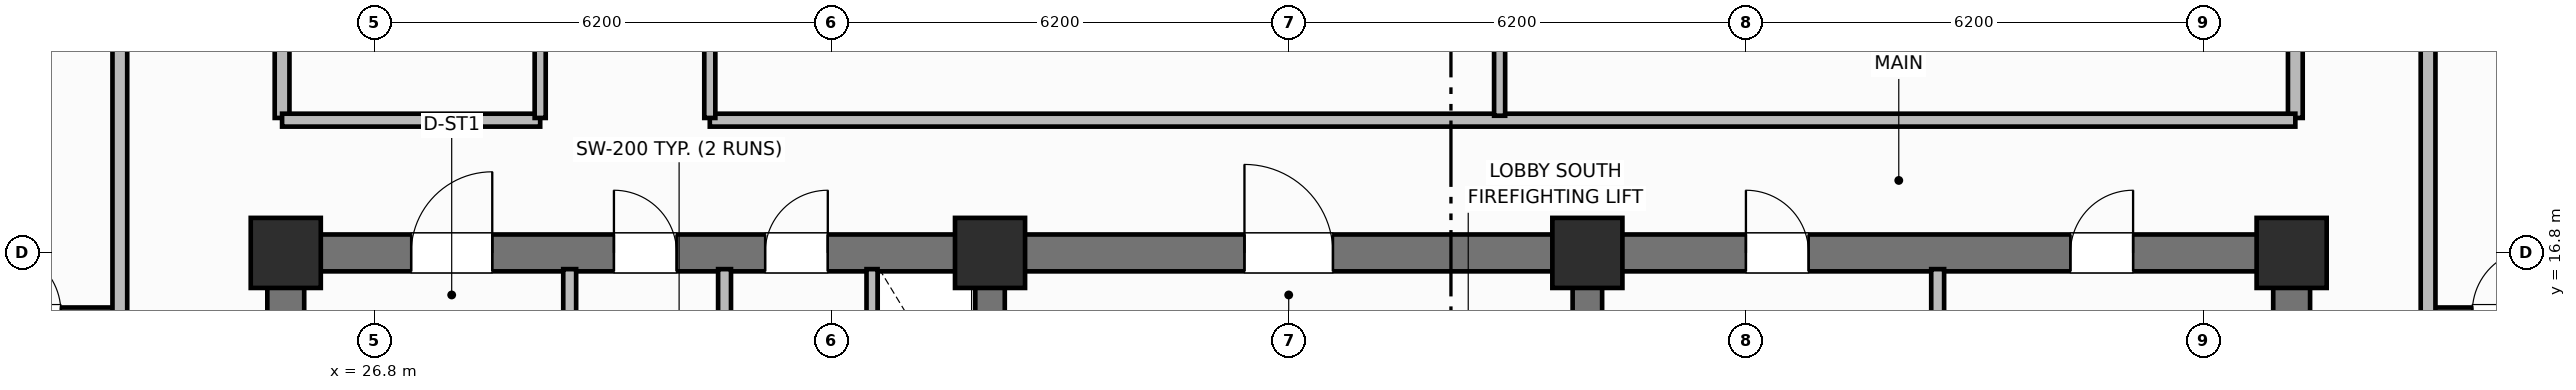
"""IFC4 building model, lengths in metres.
Left out: names, types, materials, properties, quantities, classifications, styles, units other than length and angle.
Written with IfcOpenShell. Run it as: python <this file> out.ifc"""

import sys

from ifc_helpers import new_model, si_unit, direction, frame, frame_2d, origin, origin_2d, place, context, subcontext, project, spatial, rectangle, extrude, element, fill, save


model = new_model("IFC4")
c1 = context("Model", 3, precision=1e-05, world=origin(), true_north=direction((0.0, 1.0)))
c2 = subcontext(c1, "Body", "Model", "MODEL_VIEW")
j1 = project(units=[si_unit("LENGTHUNIT", "METRE"), si_unit("PLANEANGLEUNIT", "RADIAN")], contexts=[c1])
p1 = place(None, origin())
s1 = spatial("IfcSite", under=j1, at=p1, CompositionType="ELEMENT")
p2 = place(p1, origin())
s2 = spatial("IfcBuilding", under=s1, at=p2, CompositionType="ELEMENT")
p3 = place(p2, frame((0.0, 0.0, 158.9)))
s3 = spatial("IfcBuildingStorey", under=s2, at=p3, CompositionType="ELEMENT", Elevation=158.9)
for number, where, z_axis, x_axis in (
    (1, (25.6, 10.85, 0.0), (0.0, 0.0, 1.0), (0.0, 1.0, 0.0)),
    (2, (52.8, 10.85, 0.0), (0.0, 0.0, 1.0), (0.0, 1.0, 0.0)),
):
    element("IfcWall", number, at=place(p3, frame(where, z_axis=z_axis, x_axis=x_axis)), inside=s3, PredefinedType="SHEAR", context=c2, shape_type="SweptSolid", body=[
        extrude(rectangle(XDim=5.7, YDim=0.5, at=frame_2d((2.85, 0.0))), origin(), (0.0, 0.0, 1.0), 3.7),
    ])
p4 = place(p3, frame((25.6, 16.8, 0.0), z_axis=(0.0, 0.0, 1.0), x_axis=(1.0, 0.0, 0.0)))
e3 = element("IfcWall", 3, at=p4, inside=s3, PredefinedType="SHEAR", context=c2, shape_type="SweptSolid", body=[
    extrude(rectangle(XDim=27.2, YDim=0.5, at=frame_2d((13.6, 0.0))), origin(), (0.0, 0.0, 1.0), 3.7),
])
p5 = place(p4, frame((1.7, 0.0, 0.0)))
e4 = element("IfcOpeningElement", 4, at=p5, cuts=e3, PredefinedType="OPENING", context=c2, shape_type="SweptSolid", body=[
    extrude(rectangle(XDim=1.1, YDim=2.15, at=frame_2d((0.55, 1.075))), frame((0.0, 0.26, 0.0), z_axis=(0.0, -1.0, 0.0), x_axis=(1.0, 0.0, 0.0)), (0.0, 0.0, 1.0), 0.52),
])
p6 = place(p4, frame((4.45, 0.0, 0.0)))
e5 = element("IfcOpeningElement", 5, at=p6, cuts=e3, PredefinedType="OPENING", context=c2, shape_type="SweptSolid", body=[
    extrude(rectangle(XDim=0.85, YDim=2.1, at=frame_2d((0.425, 1.05))), frame((0.0, 0.26, 0.0), z_axis=(0.0, -1.0, 0.0), x_axis=(1.0, 0.0, 0.0)), (0.0, 0.0, 1.0), 0.52),
])
p7 = place(p4, frame((6.5, 0.0, 0.0)))
e6 = element("IfcOpeningElement", 6, at=p7, cuts=e3, PredefinedType="OPENING", context=c2, shape_type="SweptSolid", body=[
    extrude(rectangle(XDim=0.85, YDim=2.1, at=frame_2d((0.425, 1.05))), frame((0.0, 0.26, 0.0), z_axis=(0.0, -1.0, 0.0), x_axis=(1.0, 0.0, 0.0)), (0.0, 0.0, 1.0), 0.52),
])
p8 = place(p4, frame((13.0, 0.0, 0.0)))
e7 = element("IfcOpeningElement", 7, at=p8, cuts=e3, PredefinedType="OPENING", context=c2, shape_type="SweptSolid", body=[
    extrude(rectangle(XDim=1.2, YDim=2.15, at=frame_2d((0.6, 1.075))), frame((0.0, 0.26, 0.0), z_axis=(0.0, -1.0, 0.0), x_axis=(1.0, 0.0, 0.0)), (0.0, 0.0, 1.0), 0.52),
])
p9 = place(p4, frame((19.8, 0.0, 0.0)))
e8 = element("IfcOpeningElement", 8, at=p9, cuts=e3, PredefinedType="OPENING", context=c2, shape_type="SweptSolid", body=[
    extrude(rectangle(XDim=0.85, YDim=2.1, at=frame_2d((0.425, 1.05))), frame((0.0, 0.26, 0.0), z_axis=(0.0, -1.0, 0.0), x_axis=(1.0, 0.0, 0.0)), (0.0, 0.0, 1.0), 0.52),
])
p10 = place(p4, frame((24.2, 0.0, 0.0)))
e9 = element("IfcOpeningElement", 9, at=p10, cuts=e3, PredefinedType="OPENING", context=c2, shape_type="SweptSolid", body=[
    extrude(rectangle(XDim=0.85, YDim=2.1, at=frame_2d((0.425, 1.05))), frame((0.0, 0.26, 0.0), z_axis=(0.0, -1.0, 0.0), x_axis=(1.0, 0.0, 0.0)), (0.0, 0.0, 1.0), 0.52),
])
for number, where, z_axis, x_axis in (
    (10, (35.15, 10.85, 0.0), (0.0, 0.0, 1.0), (0.0, 1.0, 0.0)),
    (11, (43.25, 10.85, 0.0), (0.0, 0.0, 1.0), (0.0, 1.0, 0.0)),
):
    element("IfcWall", number, at=place(p3, frame(where, z_axis=z_axis, x_axis=x_axis)), inside=s3, PredefinedType="SHEAR", context=c2, shape_type="SweptSolid", body=[
        extrude(rectangle(XDim=5.7, YDim=0.4, at=frame_2d((2.85, 0.0))), origin(), (0.0, 0.0, 1.0), 3.7),
    ])
for number, where, z_axis, x_axis in (
    (12, (25.6, 16.8, 0.0), (0.0, 0.0, 1.0), (1.0, 0.0, 0.0)),
    (13, (35.15, 16.8, 0.0), (0.0, 0.0, 1.0), (1.0, 0.0, 0.0)),
    (14, (43.25, 16.8, 0.0), (0.0, 0.0, 1.0), (1.0, 0.0, 0.0)),
    (15, (52.8, 16.8, 0.0), (0.0, 0.0, 1.0), (1.0, 0.0, 0.0)),
):
    element("IfcColumn", number, at=place(p3, frame(where, z_axis=z_axis, x_axis=x_axis)), inside=s3, PredefinedType="COLUMN", context=c2, shape_type="SweptSolid", body=[
        extrude(rectangle(XDim=0.95, YDim=0.95, at=origin_2d()), origin(), (0.0, 0.0, 1.0), 3.7),
    ])
for number, where, z_axis, x_axis in (
    (16, (29.45, 14.5, 0.0), (0.0, 0.0, 1.0), (0.0, 1.0, 0.0)),
    (17, (31.55, 14.5, 0.0), (0.0, 0.0, 1.0), (0.0, 1.0, 0.0)),
):
    element("IfcWall", number, at=place(p3, frame(where, z_axis=z_axis, x_axis=x_axis)), inside=s3, PredefinedType="PARTITIONING", context=c2, shape_type="SweptSolid", body=[
        extrude(rectangle(XDim=2.08, YDim=0.175, at=frame_2d((1.04, 0.0))), origin(), (0.0, 0.0, 1.0), 2.55),
    ])
p11 = place(p3, frame((33.55, 14.5, 0.0), z_axis=(0.0, 0.0, 1.0), x_axis=(0.0, 1.0, 0.0)))
e18 = element("IfcWall", 18, at=p11, inside=s3, PredefinedType="PARTITIONING", context=c2, shape_type="SweptSolid", body=[
    extrude(rectangle(XDim=2.08, YDim=0.15, at=frame_2d((1.04, 0.0))), origin(), (0.0, 0.0, 1.0), 2.55),
])
p12 = place(p11, frame((0.55, 0.0, 0.0)))
e19 = element("IfcOpeningElement", 19, at=p12, cuts=e18, PredefinedType="OPENING", context=c2, shape_type="SweptSolid", body=[
    extrude(rectangle(XDim=0.85, YDim=2.05, at=frame_2d((0.425, 1.025))), frame((0.0, 0.085, 0.0), z_axis=(0.0, -1.0, 0.0), x_axis=(1.0, 0.0, 0.0)), (0.0, 0.0, 1.0), 0.17),
])
p13 = place(p3, frame((48.0, 10.95, 0.0), z_axis=(0.0, 0.0, 1.0), x_axis=(0.0, 1.0, 0.0)))
e20 = element("IfcWall", 20, at=p13, inside=s3, PredefinedType="PARTITIONING", context=c2, shape_type="SweptSolid", body=[
    extrude(rectangle(XDim=5.63, YDim=0.175, at=frame_2d((2.815, 0.0))), origin(), (0.0, 0.0, 1.0), 2.55),
])
for number, where, z_axis, x_axis in (
    (21, (25.55, 18.63, 0.0), (0.0, 0.0, 1.0), (0.0, 1.0, 0.0)),
    (22, (52.85, 18.63, 0.0), (0.0, 0.0, 1.0), (0.0, 1.0, 0.0)),
):
    element("IfcWall", number, at=place(p3, frame(where, z_axis=z_axis, x_axis=x_axis)), inside=s3, PredefinedType="PARTITIONING", context=c2, shape_type="SweptSolid", body=[
        extrude(rectangle(XDim=19.14, YDim=0.2, at=frame_2d((9.57, 0.0))), origin(), (0.0, 0.0, 1.0), 2.55),
    ])
p14 = place(p3, frame((25.55, 18.6, 0.0), z_axis=(0.0, 0.0, 1.0), x_axis=(1.0, 0.0, 0.0)))
e23 = element("IfcWall", 23, at=p14, inside=s3, PredefinedType="PARTITIONING", context=c2, shape_type="SweptSolid", body=[
    extrude(rectangle(XDim=3.5, YDim=0.175, at=frame_2d((1.75, 0.0))), origin(), (0.0, 0.0, 1.0), 2.55),
])
p15 = place(p3, frame((31.35, 18.6, 0.0), z_axis=(0.0, 0.0, 1.0), x_axis=(1.0, 0.0, 0.0)))
e24 = element("IfcWall", 24, at=p15, inside=s3, PredefinedType="PARTITIONING", context=c2, shape_type="SweptSolid", body=[
    extrude(rectangle(XDim=21.5, YDim=0.175, at=frame_2d((10.75, 0.0))), origin(), (0.0, 0.0, 1.0), 2.55),
])
p16 = place(p3, frame((42.06, 18.66, 0.0), z_axis=(0.0, 0.0, 1.0), x_axis=(0.0, 1.0, 0.0)))
e25 = element("IfcWall", 25, at=p16, inside=s3, PredefinedType="PARTITIONING", context=c2, shape_type="SweptSolid", body=[
    extrude(rectangle(XDim=19.08, YDim=0.15, at=frame_2d((9.54, 0.0))), origin(), (0.0, 0.0, 1.0), 2.55),
])
p17 = place(p16, frame((6.5, 0.0, 0.0)))
e26 = element("IfcOpeningElement", 26, at=p17, cuts=e25, PredefinedType="OPENING", context=c2, shape_type="SweptSolid", body=[
    extrude(rectangle(XDim=1.0, YDim=2.15, at=frame_2d((0.5, 1.075))), frame((0.0, 0.085, 0.0), z_axis=(0.0, -1.0, 0.0), x_axis=(1.0, 0.0, 0.0)), (0.0, 0.0, 1.0), 0.17),
])
p18 = place(p3, frame((29.05, 18.63, 0.0), z_axis=(0.0, 0.0, 1.0), x_axis=(0.0, 1.0, 0.0)))
e27 = element("IfcWall", 27, at=p18, inside=s3, PredefinedType="PARTITIONING", context=c2, shape_type="SweptSolid", body=[
    extrude(rectangle(XDim=19.14, YDim=0.15, at=frame_2d((9.57, 0.0))), origin(), (0.0, 0.0, 1.0), 2.55),
])
p19 = place(p18, frame((5.5, 0.0, 0.0)))
e28 = element("IfcOpeningElement", 28, at=p19, cuts=e27, PredefinedType="OPENING", context=c2, shape_type="SweptSolid", body=[
    extrude(rectangle(XDim=1.0, YDim=2.15, at=frame_2d((0.5, 1.075))), frame((0.0, 0.085, 0.0), z_axis=(0.0, -1.0, 0.0), x_axis=(1.0, 0.0, 0.0)), (0.0, 0.0, 1.0), 0.17),
])
p20 = place(p3, frame((31.35, 18.63, 0.0), z_axis=(0.0, 0.0, 1.0), x_axis=(0.0, 1.0, 0.0)))
e29 = element("IfcWall", 29, at=p20, inside=s3, PredefinedType="PARTITIONING", context=c2, shape_type="SweptSolid", body=[
    extrude(rectangle(XDim=19.14, YDim=0.15, at=frame_2d((9.57, 0.0))), origin(), (0.0, 0.0, 1.0), 2.55),
])
p21 = place(p20, frame((5.5, 0.0, 0.0)))
e30 = element("IfcOpeningElement", 30, at=p21, cuts=e29, PredefinedType="OPENING", context=c2, shape_type="SweptSolid", body=[
    extrude(rectangle(XDim=1.0, YDim=2.15, at=frame_2d((0.5, 1.075))), frame((0.0, 0.085, 0.0), z_axis=(0.0, -1.0, 0.0), x_axis=(1.0, 0.0, 0.0)), (0.0, 0.0, 1.0), 0.17),
])
p22 = place(p3, frame((21.1, 16.0, 0.0), z_axis=(0.0, 0.0, 1.0), x_axis=(1.0, 0.0, 0.0)))
e31 = element("IfcWall", 31, at=p22, inside=s3, PredefinedType="PARTITIONING", context=c2, shape_type="SweptSolid", body=[
    extrude(rectangle(XDim=2.25, YDim=0.12, at=frame_2d((1.125, 0.0))), origin(), (0.0, 0.0, 1.0), 2.55),
])
p23 = place(p22, frame((0.6, 0.0, 0.0)))
e32 = element("IfcOpeningElement", 32, at=p23, cuts=e31, PredefinedType="OPENING", context=c2, shape_type="SweptSolid", body=[
    extrude(rectangle(XDim=0.85, YDim=2.1, at=frame_2d((0.425, 1.05))), frame((0.0, 0.07, 0.0), z_axis=(0.0, -1.0, 0.0), x_axis=(1.0, 0.0, 0.0)), (0.0, 0.0, 1.0), 0.14),
])
p24 = place(p3, frame((23.35, 10.6, 0.0), z_axis=(0.0, 0.0, 1.0), x_axis=(0.0, 1.0, 0.0)))
e33 = element("IfcWall", 33, at=p24, inside=s3, PredefinedType="PARTITIONING", context=c2, shape_type="SweptSolid", body=[
    extrude(rectangle(XDim=35.2, YDim=0.2, at=frame_2d((17.6, 0.0))), origin(), (0.0, 0.0, 1.0), 2.55),
])
p25 = place(p24, frame((2.65, 0.0, 0.0)))
e34 = element("IfcOpeningElement", 34, at=p25, cuts=e33, PredefinedType="OPENING", context=c2, shape_type="SweptSolid", body=[
    extrude(rectangle(XDim=1.0, YDim=2.15, at=frame_2d((0.5, 1.075))), frame((0.0, 0.11, 0.0), z_axis=(0.0, -1.0, 0.0), x_axis=(1.0, 0.0, 0.0)), (0.0, 0.0, 1.0), 0.22),
])
p26 = place(p24, frame((12.65, 0.0, 0.0)))
e35 = element("IfcOpeningElement", 35, at=p26, cuts=e33, PredefinedType="OPENING", context=c2, shape_type="SweptSolid", body=[
    extrude(rectangle(XDim=1.0, YDim=2.15, at=frame_2d((0.5, 1.075))), frame((0.0, 0.11, 0.0), z_axis=(0.0, -1.0, 0.0), x_axis=(1.0, 0.0, 0.0)), (0.0, 0.0, 1.0), 0.22),
])
p27 = place(p24, frame((23.782, 0.0, 0.0)))
e36 = element("IfcOpeningElement", 36, at=p27, cuts=e33, PredefinedType="OPENING", context=c2, shape_type="SweptSolid", body=[
    extrude(rectangle(XDim=1.0, YDim=2.15, at=frame_2d((0.5, 1.075))), frame((0.0, 0.11, 0.0), z_axis=(0.0, -1.0, 0.0), x_axis=(1.0, 0.0, 0.0)), (0.0, 0.0, 1.0), 0.22),
])
p28 = place(p3, frame((54.65, 16.0, 0.0), z_axis=(0.0, 0.0, 1.0), x_axis=(1.0, 0.0, 0.0)))
e37 = element("IfcWall", 37, at=p28, inside=s3, PredefinedType="PARTITIONING", context=c2, shape_type="SweptSolid", body=[
    extrude(rectangle(XDim=2.25, YDim=0.12, at=frame_2d((1.125, 0.0))), origin(), (0.0, 0.0, 1.0), 2.55),
])
p29 = place(p28, frame((0.6, 0.0, 0.0)))
e38 = element("IfcOpeningElement", 38, at=p29, cuts=e37, PredefinedType="OPENING", context=c2, shape_type="SweptSolid", body=[
    extrude(rectangle(XDim=0.85, YDim=2.1, at=frame_2d((0.425, 1.05))), frame((0.0, 0.07, 0.0), z_axis=(0.0, -1.0, 0.0), x_axis=(1.0, 0.0, 0.0)), (0.0, 0.0, 1.0), 0.14),
])
p30 = place(p3, frame((54.65, 10.6, 0.0), z_axis=(0.0, 0.0, 1.0), x_axis=(0.0, 1.0, 0.0)))
e39 = element("IfcWall", 39, at=p30, inside=s3, PredefinedType="PARTITIONING", context=c2, shape_type="SweptSolid", body=[
    extrude(rectangle(XDim=35.2, YDim=0.2, at=frame_2d((17.6, 0.0))), origin(), (0.0, 0.0, 1.0), 2.55),
])
p31 = place(p30, frame((2.65, 0.0, 0.0)))
e40 = element("IfcOpeningElement", 40, at=p31, cuts=e39, PredefinedType="OPENING", context=c2, shape_type="SweptSolid", body=[
    extrude(rectangle(XDim=1.0, YDim=2.15, at=frame_2d((0.5, 1.075))), frame((0.0, 0.11, 0.0), z_axis=(0.0, -1.0, 0.0), x_axis=(1.0, 0.0, 0.0)), (0.0, 0.0, 1.0), 0.22),
])
p32 = place(p30, frame((22.75, 0.0, 0.0)))
e41 = element("IfcOpeningElement", 41, at=p32, cuts=e39, PredefinedType="OPENING", context=c2, shape_type="SweptSolid", body=[
    extrude(rectangle(XDim=1.0, YDim=2.15, at=frame_2d((0.5, 1.075))), frame((0.0, 0.11, 0.0), z_axis=(0.0, -1.0, 0.0), x_axis=(1.0, 0.0, 0.0)), (0.0, 0.0, 1.0), 0.22),
])
p33 = place(p23, origin())
e42 = element("IfcDoor", 42, at=p33, inside=s3, OperationType="SINGLE_SWING_LEFT", PredefinedType="DOOR", context=c2, shape_type="SweptSolid", body=[
    extrude(rectangle(XDim=0.85, YDim=2.1, at=frame_2d((0.425, 1.05))), frame((0.0, 0.025, 0.0), z_axis=(0.0, -1.0, 0.0), x_axis=(1.0, 0.0, 0.0)), (0.0, 0.0, 1.0), 0.05),
])
fill(e32, e42)
p34 = place(p29, origin())
e43 = element("IfcDoor", 43, at=p34, inside=s3, OperationType="SINGLE_SWING_RIGHT", PredefinedType="DOOR", context=c2, shape_type="SweptSolid", body=[
    extrude(rectangle(XDim=0.85, YDim=2.1, at=frame_2d((0.425, 1.05))), frame((0.0, 0.025, 0.0), z_axis=(0.0, -1.0, 0.0), x_axis=(1.0, 0.0, 0.0)), (0.0, 0.0, 1.0), 0.05),
])
fill(e38, e43)
p35 = place(p5, origin())
e44 = element("IfcDoor", 44, at=p35, inside=s3, OperationType="SINGLE_SWING_RIGHT", PredefinedType="DOOR", context=c2, shape_type="SweptSolid", body=[
    extrude(rectangle(XDim=1.1, YDim=2.15, at=frame_2d((0.55, 1.075))), frame((0.0, 0.025, 0.0), z_axis=(0.0, -1.0, 0.0), x_axis=(1.0, 0.0, 0.0)), (0.0, 0.0, 1.0), 0.05),
])
fill(e4, e44)
p36 = place(p6, origin())
e45 = element("IfcDoor", 45, at=p36, inside=s3, OperationType="SINGLE_SWING_LEFT", PredefinedType="DOOR", context=c2, shape_type="SweptSolid", body=[
    extrude(rectangle(XDim=0.85, YDim=2.1, at=frame_2d((0.425, 1.05))), frame((0.0, 0.025, 0.0), z_axis=(0.0, -1.0, 0.0), x_axis=(1.0, 0.0, 0.0)), (0.0, 0.0, 1.0), 0.05),
])
fill(e5, e45)
p37 = place(p7, origin())
e46 = element("IfcDoor", 46, at=p37, inside=s3, OperationType="SINGLE_SWING_RIGHT", PredefinedType="DOOR", context=c2, shape_type="SweptSolid", body=[
    extrude(rectangle(XDim=0.85, YDim=2.1, at=frame_2d((0.425, 1.05))), frame((0.0, 0.025, 0.0), z_axis=(0.0, -1.0, 0.0), x_axis=(1.0, 0.0, 0.0)), (0.0, 0.0, 1.0), 0.05),
])
fill(e6, e46)
p38 = place(p8, origin())
e47 = element("IfcDoor", 47, at=p38, inside=s3, OperationType="SINGLE_SWING_LEFT", PredefinedType="DOOR", context=c2, shape_type="SweptSolid", body=[
    extrude(rectangle(XDim=1.2, YDim=2.15, at=frame_2d((0.6, 1.075))), frame((0.0, 0.025, 0.0), z_axis=(0.0, -1.0, 0.0), x_axis=(1.0, 0.0, 0.0)), (0.0, 0.0, 1.0), 0.05),
])
fill(e7, e47)
p39 = place(p9, origin())
e48 = element("IfcDoor", 48, at=p39, inside=s3, OperationType="SINGLE_SWING_LEFT", PredefinedType="DOOR", context=c2, shape_type="SweptSolid", body=[
    extrude(rectangle(XDim=0.85, YDim=2.1, at=frame_2d((0.425, 1.05))), frame((0.0, 0.025, 0.0), z_axis=(0.0, -1.0, 0.0), x_axis=(1.0, 0.0, 0.0)), (0.0, 0.0, 1.0), 0.05),
])
fill(e8, e48)
p40 = place(p10, origin())
e49 = element("IfcDoor", 49, at=p40, inside=s3, OperationType="SINGLE_SWING_RIGHT", PredefinedType="DOOR", context=c2, shape_type="SweptSolid", body=[
    extrude(rectangle(XDim=0.85, YDim=2.1, at=frame_2d((0.425, 1.05))), frame((0.0, 0.025, 0.0), z_axis=(0.0, -1.0, 0.0), x_axis=(1.0, 0.0, 0.0)), (0.0, 0.0, 1.0), 0.05),
])
fill(e9, e49)
save(model, sys.argv[1])
